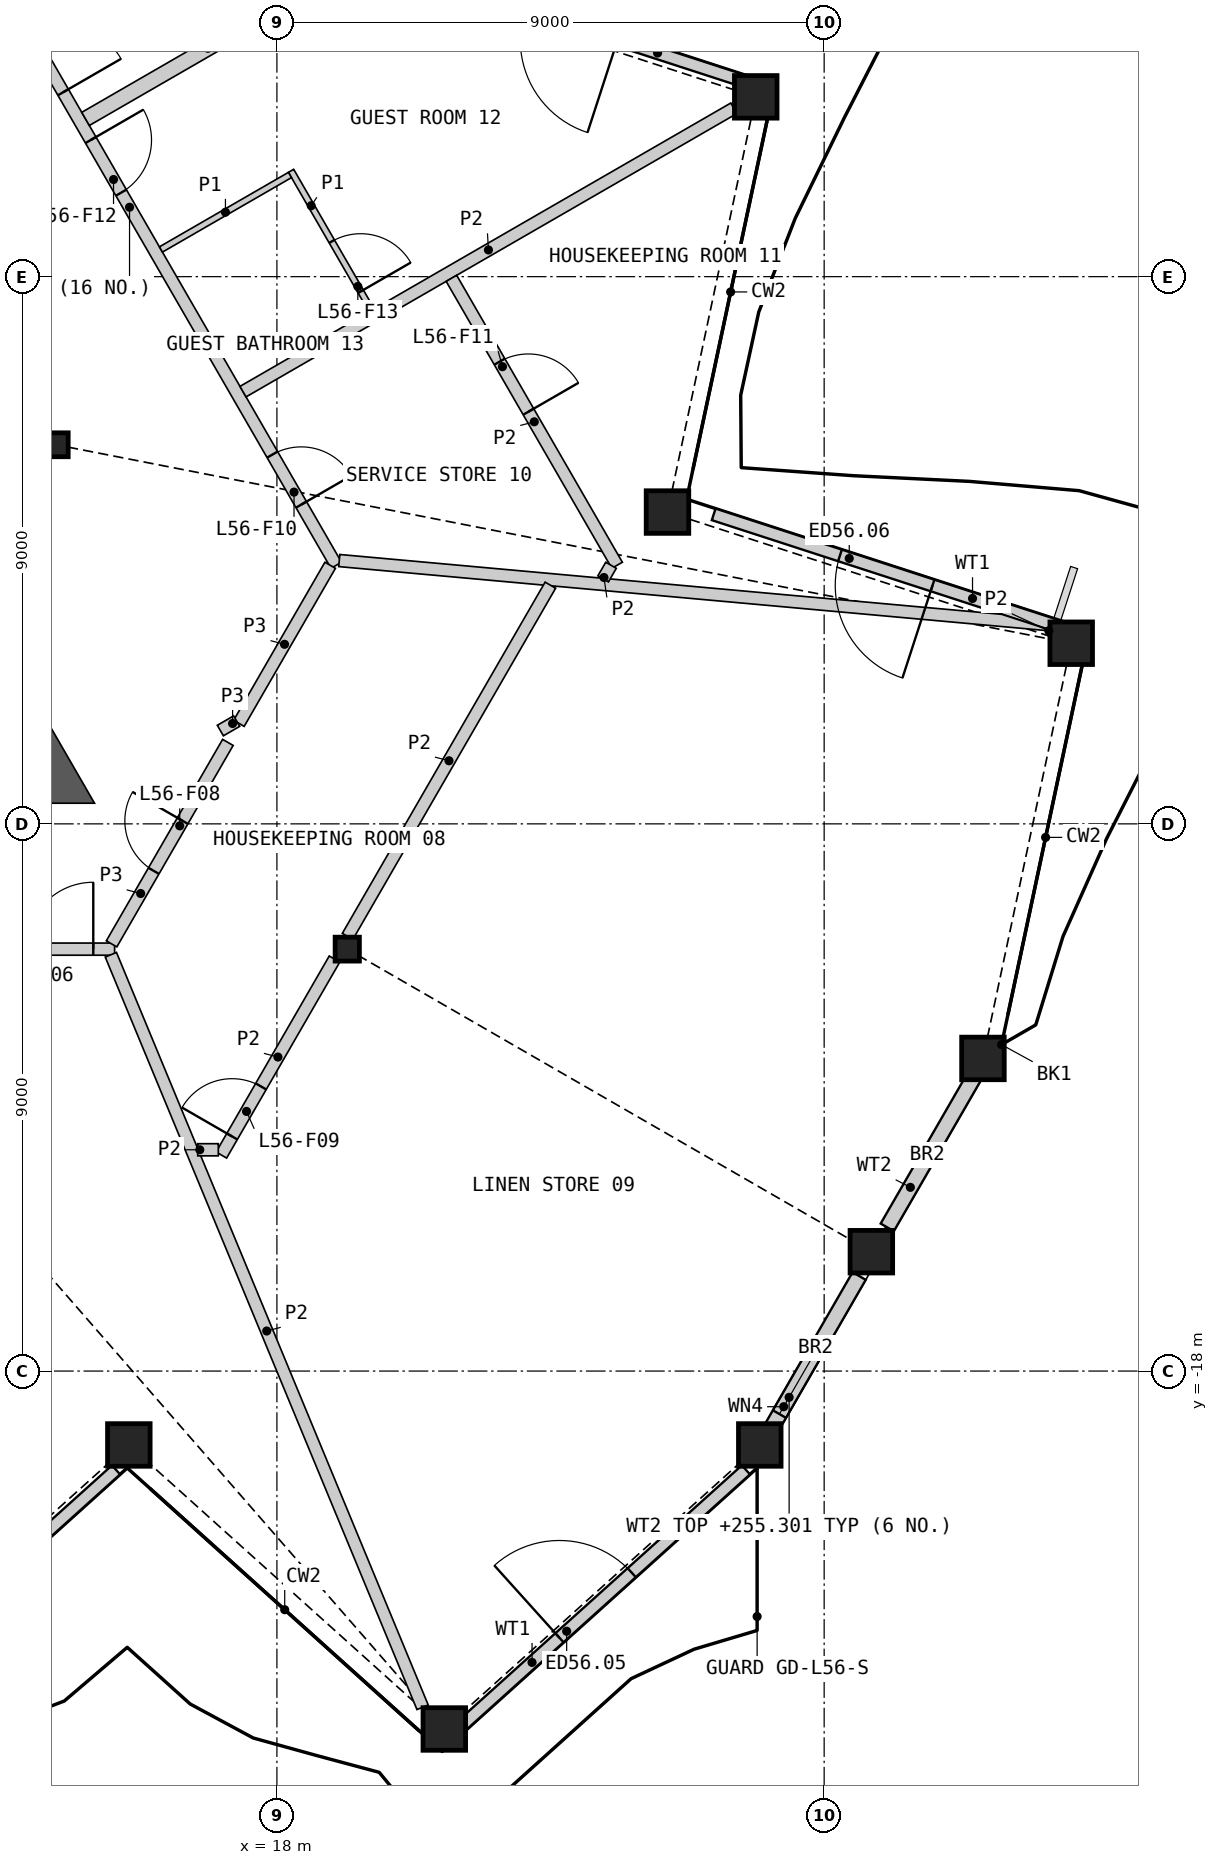
"""IFC4 building model, lengths in metres.
Left out: names, types, materials, properties, quantities, classifications, styles, units other than length and angle.
Written with IfcOpenShell. Run it as: python <this file> out.ifc"""

import sys

from ifc_helpers import new_model, si_unit, direction, frame, frame_2d, origin, origin_2d, place, context, subcontext, project, spatial, polyline, rectangle, hollow_rectangle, i_section, outline, extrude, element, fill, save


model = new_model("IFC4")
c1 = context("Model", 3, precision=1e-05, world=origin(), true_north=direction((0.0, 1.0)))
c2 = subcontext(c1, "Body", "Model", "MODEL_VIEW")
j1 = project(units=[si_unit("LENGTHUNIT", "METRE"), si_unit("PLANEANGLEUNIT", "RADIAN")], contexts=[c1])
p1 = place(None, origin())
s1 = spatial("IfcSite", under=j1, at=p1, CompositionType="ELEMENT")
p2 = place(p1, origin())
s2 = spatial("IfcBuilding", under=s1, at=p2, CompositionType="ELEMENT")
p3 = place(p2, frame((0.0, 0.0, 252.6)))
s3 = spatial("IfcBuildingStorey", under=s2, at=p3, CompositionType="ELEMENT", Elevation=252.6)
for number, where, z_axis, x_axis in (
    (1, (15.565, -19.215, 0.0), (0.0, 0.0, 1.0), (1.0, 0.0, 0.0)),
    (2, (20.753, -23.887, 0.0), (0.0, 0.0, 1.0), (1.0, 0.0, 0.0)),
    (3, (25.941, -19.215, 0.0), (0.0, 0.0, 1.0), (1.0, 0.0, 0.0)),
    (4, (27.776, -16.037, 0.0), (0.0, 0.0, 1.0), (1.0, 0.0, 0.0)),
    (5, (29.612, -12.858, 0.0), (0.0, 0.0, 1.0), (1.0, 0.0, 0.0)),
    (6, (31.063, -6.029, 0.0), (0.0, 0.0, 1.0), (1.0, 0.0, 0.0)),
    (7, (24.423, -3.872, 0.0), (0.0, 0.0, 1.0), (1.0, 0.0, 0.0)),
    (8, (25.875, 2.957, 0.0), (0.0, 0.0, 1.0), (1.0, 0.0, 0.0)),
):
    element("IfcColumn", number, at=place(p3, frame(where, z_axis=z_axis, x_axis=x_axis)), inside=s3, PredefinedType="COLUMN", context=c2, shape_type="SweptSolid", body=[
        extrude(hollow_rectangle(XDim=0.7, YDim=0.7, WallThickness=0.045, at=origin_2d()), origin(), (0.0, 0.0, 1.0), 3.6),
    ])
for number, where, z_axis, x_axis in (
    (9, (19.157, -11.06, 0.0), (0.0, 0.0, 1.0), (1.0, 0.0, 0.0)),
    (10, (14.368, -2.765, 0.0), (0.0, 0.0, 1.0), (1.0, 0.0, 0.0)),
):
    element("IfcColumn", number, at=place(p3, frame(where, z_axis=z_axis, x_axis=x_axis)), inside=s3, PredefinedType="COLUMN", context=c2, shape_type="SweptSolid", body=[
        extrude(i_section(OverallWidth=0.399, OverallDepth=0.393, WebThickness=0.023, FlangeThickness=0.037, at=origin_2d()), origin(), (0.0, 0.0, 1.0), 3.6),
    ])
p4 = place(p3, frame((10.664, -23.848, 0.0), z_axis=(0.0, 0.0, 1.0), x_axis=(0.74314024121, 0.669135697668, 0.0)))
e11 = element("IfcWall", 11, at=p4, inside=s3, PredefinedType="SOLIDWALL", context=c2, shape_type="SweptSolid", body=[
    extrude(rectangle(XDim=6.311, YDim=0.2, at=frame_2d((3.156, 0.0))), origin(), (0.0, 0.0, 1.0), 2.701),
])
p5 = place(p4, frame((2.184, 0.0, 0.0)))
e12 = element("IfcOpeningElement", 12, at=p5, cuts=e11, PredefinedType="OPENING", context=c2, shape_type="SweptSolid", body=[
    extrude(rectangle(XDim=1.6, YDim=2.4, at=frame_2d((0.8, 1.2))), frame((0.0, 0.11, 0.0), z_axis=(0.0, -1.0, 0.0), x_axis=(1.0, 0.0, 0.0)), (0.0, 0.0, 1.0), 0.22),
])
p6 = place(p3, frame((21.023, -23.848, 0.0), z_axis=(0.0, 0.0, 1.0), x_axis=(0.74314024121, 0.669135697668, 0.0)))
e13 = element("IfcWall", 13, at=p6, inside=s3, PredefinedType="SOLIDWALL", context=c2, shape_type="SweptSolid", body=[
    extrude(rectangle(XDim=6.311, YDim=0.2, at=frame_2d((3.156, 0.0))), origin(), (0.0, 0.0, 1.0), 2.701),
])
p7 = place(p6, frame((2.184, 0.0, 0.0)))
e14 = element("IfcOpeningElement", 14, at=p7, cuts=e13, PredefinedType="OPENING", context=c2, shape_type="SweptSolid", body=[
    extrude(rectangle(XDim=1.6, YDim=2.4, at=frame_2d((0.8, 1.2))), frame((0.0, 0.11, 0.0), z_axis=(0.0, -1.0, 0.0), x_axis=(1.0, 0.0, 0.0)), (0.0, 0.0, 1.0), 0.22),
])
p8 = place(p3, frame((26.04, -19.097, 0.0), z_axis=(0.0, 0.0, 1.0), x_axis=(0.499976998774, 0.866038683141, 0.0)))
e15 = element("IfcWall", 15, at=p8, inside=s3, PredefinedType="SOLIDWALL", context=c2, shape_type="SweptSolid", body=[
    extrude(rectangle(XDim=3.072, YDim=0.25, at=frame_2d((1.536, 0.0))), origin(), (0.0, 0.0, 1.0), 2.701),
])
p9 = place(p8, frame((0.45, 0.0, 1.8)))
e16 = element("IfcOpeningElement", 16, at=p9, cuts=e15, PredefinedType="OPENING", context=c2, shape_type="SweptSolid", body=[
    extrude(rectangle(XDim=1.4, YDim=0.7, at=frame_2d((0.7, 0.35))), frame((0.0, 0.135, 0.0), z_axis=(0.0, -1.0, 0.0), x_axis=(1.0, 0.0, 0.0)), (0.0, 0.0, 1.0), 0.27),
])
p10 = place(p3, frame((28.038, -15.637, 0.0), z_axis=(0.0, 0.0, 1.0), x_axis=(0.500023511883, 0.866011828767, 0.0)))
e17 = element("IfcWall", 17, at=p10, inside=s3, PredefinedType="SOLIDWALL", context=c2, shape_type="SweptSolid", body=[
    extrude(rectangle(XDim=3.042, YDim=0.25, at=frame_2d((1.521, 0.0))), origin(), (0.0, 0.0, 1.0), 2.701),
])
p11 = place(p3, frame((30.859, -5.754, 0.0), z_axis=(0.0, 0.0, 1.0), x_axis=(-0.951049400374, 0.309038894069, 0.0)))
e18 = element("IfcWall", 18, at=p11, inside=s3, PredefinedType="SOLIDWALL", context=c2, shape_type="SweptSolid", body=[
    extrude(rectangle(XDim=5.968, YDim=0.2, at=frame_2d((2.984, 0.0))), origin(), (0.0, 0.0, 1.0), 2.701),
])
p12 = place(p11, frame((2.184, 0.0, 0.0)))
e19 = element("IfcOpeningElement", 19, at=p12, cuts=e18, PredefinedType="OPENING", context=c2, shape_type="SweptSolid", body=[
    extrude(rectangle(XDim=1.6, YDim=2.4, at=frame_2d((0.8, 1.2))), frame((0.0, 0.11, 0.0), z_axis=(0.0, -1.0, 0.0), x_axis=(1.0, 0.0, 0.0)), (0.0, 0.0, 1.0), 0.22),
])
p13 = place(p3, frame((25.679, 3.217, 0.0), z_axis=(0.0, 0.0, 1.0), x_axis=(-0.951049400374, 0.309038894069, 0.0)))
e20 = element("IfcWall", 20, at=p13, inside=s3, PredefinedType="SOLIDWALL", context=c2, shape_type="SweptSolid", body=[
    extrude(rectangle(XDim=5.968, YDim=0.2, at=frame_2d((2.984, 0.0))), origin(), (0.0, 0.0, 1.0), 2.701),
])
p14 = place(p13, frame((2.184, 0.0, 0.0)))
e21 = element("IfcOpeningElement", 21, at=p14, cuts=e20, PredefinedType="OPENING", context=c2, shape_type="SweptSolid", body=[
    extrude(rectangle(XDim=1.6, YDim=2.4, at=frame_2d((0.8, 1.2))), frame((0.0, 0.11, 0.0), z_axis=(0.0, -1.0, 0.0), x_axis=(1.0, 0.0, 0.0)), (0.0, 0.0, 1.0), 0.22),
])
p15 = place(p3, origin())
e22 = element("IfcWall", 22, at=p15, inside=s3, PredefinedType="SHEAR", context=c2, shape_type="SweptSolid", body=[
    extrude(outline(polyline([(12.748, -8.66), (12.748, -7.36), (13.874, -6.71), (15.0, -8.66), (12.748, -8.66)])), origin(), (0.0, 0.0, 1.0), 3.25),
])
p16 = place(p3, frame((5.377, 18.807, 0.0), z_axis=(0.0, 0.0, 1.0), x_axis=(0.499999852422, -0.866025488988, 0.0)))
e23 = element("IfcWall", 23, at=p16, inside=s3, PredefinedType="PARTITIONING", context=c2, shape_type="SweptSolid", body=[
    extrude(rectangle(XDim=27.198, YDim=0.2, at=frame_2d((13.599, 0.0))), origin(), (0.0, 0.0, 1.0), 3.25),
])
p17 = place(p16, frame((25.096, 0.0, 0.0)))
e24 = element("IfcOpeningElement", 24, at=p17, cuts=e23, PredefinedType="OPENING", context=c2, shape_type="SweptSolid", body=[
    extrude(rectangle(XDim=0.95, YDim=2.1, at=frame_2d((0.475, 1.05))), frame((0.0, 0.11, 0.0), z_axis=(0.0, -1.0, 0.0), x_axis=(1.0, 0.0, 0.0)), (0.0, 0.0, 1.0), 0.22),
])
p18 = place(p16, frame((19.122, 0.0, 0.0)))
e25 = element("IfcOpeningElement", 25, at=p18, cuts=e23, PredefinedType="OPENING", context=c2, shape_type="SweptSolid", body=[
    extrude(rectangle(XDim=1.0, YDim=2.1, at=frame_2d((0.5, 1.05))), frame((0.0, 0.11, 0.0), z_axis=(0.0, -1.0, 0.0), x_axis=(1.0, 0.0, 0.0)), (0.0, 0.0, 1.0), 0.22),
])
p19 = place(p16, frame((17.115, 0.0, 0.0)))
e26 = element("IfcOpeningElement", 26, at=p19, cuts=e23, PredefinedType="OPENING", context=c2, shape_type="SweptSolid", body=[
    extrude(rectangle(XDim=1.1, YDim=2.1, at=frame_2d((0.55, 1.05))), frame((0.0, 0.11, 0.0), z_axis=(0.0, -1.0, 0.0), x_axis=(1.0, 0.0, 0.0)), (0.0, 0.0, 1.0), 0.22),
])
p20 = place(p16, frame((0.35, 0.0, 0.0)))
e27 = element("IfcOpeningElement", 27, at=p20, cuts=e23, PredefinedType="OPENING", context=c2, shape_type="SweptSolid", body=[
    extrude(rectangle(XDim=1.1, YDim=2.1, at=frame_2d((0.55, 1.05))), frame((0.0, 0.11, 0.0), z_axis=(0.0, -1.0, 0.0), x_axis=(1.0, 0.0, 0.0)), (0.0, 0.0, 1.0), 0.22),
])
p21 = place(p3, frame((9.788, -11.06, 0.0), z_axis=(0.0, 0.0, 1.0), x_axis=(1.0, 0.0, 0.0)))
e28 = element("IfcWall", 28, at=p21, inside=s3, PredefinedType="PARTITIONING", context=c2, shape_type="SweptSolid", body=[
    extrude(rectangle(XDim=5.543, YDim=0.2, at=frame_2d((2.771, 0.0))), origin(), (0.0, 0.0, 1.0), 3.25),
])
p22 = place(p21, frame((4.092, 0.0, 0.0)))
e29 = element("IfcOpeningElement", 29, at=p22, cuts=e28, PredefinedType="OPENING", context=c2, shape_type="SweptSolid", body=[
    extrude(rectangle(XDim=1.1, YDim=2.1, at=frame_2d((0.55, 1.05))), frame((0.0, 0.11, 0.0), z_axis=(0.0, -1.0, 0.0), x_axis=(1.0, 0.0, 0.0)), (0.0, 0.0, 1.0), 0.22),
])
p23 = place(p3, frame((14.853, 2.594, 0.0), z_axis=(0.0, 0.0, 1.0), x_axis=(0.866021891294, 0.500006083763, 0.0)))
e30 = element("IfcWall", 30, at=p23, inside=s3, PredefinedType="PARTITIONING", context=c2, shape_type="SweptSolid", body=[
    extrude(rectangle(XDim=4.645, YDim=0.25, at=frame_2d((2.322, 0.0))), origin(), (0.0, 0.0, 1.0), 2.404),
])
p24 = place(p3, frame((15.281, -10.974, 0.0), z_axis=(0.0, 0.0, 1.0), x_axis=(0.499989446428, 0.866031496806, 0.0)))
e31 = element("IfcWall", 31, at=p24, inside=s3, PredefinedType="PARTITIONING", context=c2, shape_type="SweptSolid", body=[
    extrude(rectangle(XDim=3.826, YDim=0.2, at=frame_2d((1.913, 0.0))), origin(), (0.0, 0.0, 1.0), 3.25),
])
p25 = place(p24, frame((1.386, 0.0, 0.0)))
e32 = element("IfcOpeningElement", 32, at=p25, cuts=e31, PredefinedType="OPENING", context=c2, shape_type="SweptSolid", body=[
    extrude(rectangle(XDim=0.95, YDim=2.1, at=frame_2d((0.475, 1.05))), frame((0.0, 0.11, 0.0), z_axis=(0.0, -1.0, 0.0), x_axis=(1.0, 0.0, 0.0)), (0.0, 0.0, 1.0), 0.22),
])
p26 = place(p3, frame((17.375, -7.347, 0.0), z_axis=(0.0, 0.0, 1.0), x_axis=(0.499952404951, 0.866052881055, 0.0)))
e33 = element("IfcWall", 33, at=p26, inside=s3, PredefinedType="PARTITIONING", context=c2, shape_type="SweptSolid", body=[
    extrude(rectangle(XDim=3.002, YDim=0.2, at=frame_2d((1.501, 0.0))), origin(), (0.0, 0.0, 1.0), 3.25),
])
p27 = place(p3, frame((17.07, -7.465, 0.0), z_axis=(0.0, 0.0, 1.0), x_axis=(0.866054481515, 0.499949632511, 0.0)))
e34 = element("IfcWall", 34, at=p27, inside=s3, PredefinedType="PARTITIONING", context=c2, shape_type="SweptSolid", body=[
    extrude(rectangle(XDim=0.31, YDim=0.2, at=frame_2d((0.155, 0.0))), origin(), (0.0, 0.0, 1.0), 3.25),
])
p28 = place(p3, frame((15.269, -11.153, 0.0), z_axis=(0.0, 0.0, 1.0), x_axis=(0.382692998932, -0.923875569851, 0.0)))
e35 = element("IfcWall", 35, at=p28, inside=s3, PredefinedType="PARTITIONING", context=c2, shape_type="SweptSolid", body=[
    extrude(rectangle(XDim=13.397, YDim=0.2, at=frame_2d((6.698, 0.0))), origin(), (0.0, 0.0, 1.0), 2.404),
])
p29 = place(p3, origin())
e36 = element("IfcWall", 36, at=p29, inside=s3, PredefinedType="PARTITIONING", context=c2, shape_type="SweptSolid", body=[
    extrude(outline(polyline([(30.694, -5.824), (19.017, -4.769), (19.034, -4.57), (29.918, -5.553), (30.696, -5.806), (30.694, -5.824)])), origin(), (0.0, 0.0, 1.0), 2.404),
])
p30 = place(p3, frame((17.443, -1.891, 0.0), z_axis=(0.0, 0.0, 1.0), x_axis=(0.866019838429, 0.500009639354, 0.0)))
e37 = element("IfcWall", 37, at=p30, inside=s3, PredefinedType="PARTITIONING", context=c2, shape_type="SweptSolid", body=[
    extrude(rectangle(XDim=9.321, YDim=0.2, at=frame_2d((4.661, 0.0))), origin(), (0.0, 0.0, 1.0), 2.404),
])
p31 = place(p3, frame((19.162, -10.851, 0.0), z_axis=(0.0, 0.0, 1.0), x_axis=(0.500008654708, 0.866020406929, 0.0)))
e38 = element("IfcWall", 38, at=p31, inside=s3, PredefinedType="PARTITIONING", context=c2, shape_type="SweptSolid", body=[
    extrude(rectangle(XDim=6.67, YDim=0.2, at=frame_2d((3.335, 0.0))), origin(), (0.0, 0.0, 1.0), 2.404),
])
p32 = place(p3, frame((20.87, -0.028, 0.0), z_axis=(0.0, 0.0, 1.0), x_axis=(0.499993928037, -0.866028909405, 0.0)))
e39 = element("IfcWall", 39, at=p32, inside=s3, PredefinedType="PARTITIONING", context=c2, shape_type="SweptSolid", body=[
    extrude(rectangle(XDim=5.449, YDim=0.2, at=frame_2d((2.725, 0.0))), origin(), (0.0, 0.0, 1.0), 2.404),
])
p33 = place(p32, frame((1.583, 0.0, 0.0)))
e40 = element("IfcOpeningElement", 40, at=p33, cuts=e39, PredefinedType="OPENING", context=c2, shape_type="SweptSolid", body=[
    extrude(rectangle(XDim=0.95, YDim=2.1, at=frame_2d((0.475, 1.05))), frame((0.0, 0.11, 0.0), z_axis=(0.0, -1.0, 0.0), x_axis=(1.0, 0.0, 0.0)), (0.0, 0.0, 1.0), 0.22),
])
p34 = place(p3, frame((17.086, -14.447, 0.0), z_axis=(0.0, 0.0, 1.0), x_axis=(0.500004411858, 0.866022856582, 0.0)))
e41 = element("IfcWall", 41, at=p34, inside=s3, PredefinedType="PARTITIONING", context=c2, shape_type="SweptSolid", body=[
    extrude(rectangle(XDim=3.723, YDim=0.2, at=frame_2d((1.861, 0.0))), origin(), (0.0, 0.0, 1.0), 2.404),
])
p35 = place(p34, frame((0.353, 0.0, 0.0)))
e42 = element("IfcOpeningElement", 42, at=p35, cuts=e41, PredefinedType="OPENING", context=c2, shape_type="SweptSolid", body=[
    extrude(rectangle(XDim=0.95, YDim=2.1, at=frame_2d((0.475, 1.05))), frame((0.0, 0.11, 0.0), z_axis=(0.0, -1.0, 0.0), x_axis=(1.0, 0.0, 0.0)), (0.0, 0.0, 1.0), 0.22),
])
p36 = place(p3, frame((16.698, -14.36, 0.0), z_axis=(0.0, 0.0, 1.0), x_axis=(1.0, 0.0, 0.0)))
e43 = element("IfcWall", 43, at=p36, inside=s3, PredefinedType="PARTITIONING", context=c2, shape_type="SweptSolid", body=[
    extrude(rectangle(XDim=0.338, YDim=0.2, at=frame_2d((0.169, 0.0))), origin(), (0.0, 0.0, 1.0), 2.404),
])
p37 = place(p3, frame((23.366, -4.97, 0.0), z_axis=(0.0, 0.0, 1.0), x_axis=(0.500104332946, 0.86596515875, 0.0)))
e44 = element("IfcWall", 44, at=p37, inside=s3, PredefinedType="PARTITIONING", context=c2, shape_type="SweptSolid", body=[
    extrude(rectangle(XDim=0.258, YDim=0.2, at=frame_2d((0.129, 0.0))), origin(), (0.0, 0.0, 1.0), 2.404),
])
p38 = place(p3, frame((18.233, 1.74, 0.0), z_axis=(0.0, 0.0, 1.0), x_axis=(0.499993606316, -0.866029095148, 0.0)))
e45 = element("IfcWall", 45, at=p38, inside=s3, PredefinedType="PARTITIONING", context=c2, shape_type="SweptSolid", body=[
    extrude(rectangle(XDim=2.65, YDim=0.1, at=frame_2d((1.325, 0.0))), origin(), (0.0, 0.0, 1.0), 2.404),
])
p39 = place(p38, frame((1.341, 0.0, 0.0)))
e46 = element("IfcOpeningElement", 46, at=p39, cuts=e45, PredefinedType="OPENING", context=c2, shape_type="SweptSolid", body=[
    extrude(rectangle(XDim=0.95, YDim=2.1, at=frame_2d((0.475, 1.05))), frame((0.0, 0.06, 0.0), z_axis=(0.0, -1.0, 0.0), x_axis=(1.0, 0.0, 0.0)), (0.0, 0.0, 1.0), 0.12),
])
p40 = place(p3, frame((16.093, 0.447, 0.0), z_axis=(0.0, 0.0, 1.0), x_axis=(0.866057815567, 0.499943856944, 0.0)))
e47 = element("IfcWall", 47, at=p40, inside=s3, PredefinedType="PARTITIONING", context=c2, shape_type="SweptSolid", body=[
    extrude(rectangle(XDim=2.45, YDim=0.1, at=frame_2d((1.225, 0.0))), origin(), (0.0, 0.0, 1.0), 2.404),
])
p41 = place(p7, origin())
e48 = element("IfcDoor", 48, at=p41, inside=s3, OperationType="DOUBLE_DOOR_SINGLE_SWING", PredefinedType="DOOR", context=c2, shape_type="SweptSolid", body=[
    extrude(rectangle(XDim=1.6, YDim=2.4, at=frame_2d((0.8, 1.2))), frame((0.0, 0.025, 0.0), z_axis=(0.0, -1.0, 0.0), x_axis=(1.0, 0.0, 0.0)), (0.0, 0.0, 1.0), 0.05),
])
fill(e14, e48)
p42 = place(p9, origin())
e49 = element("IfcWindow", 49, at=p42, inside=s3, PartitioningType="SINGLE_PANEL", PredefinedType="WINDOW", context=c2, shape_type="SweptSolid", body=[
    extrude(rectangle(XDim=1.4, YDim=0.7, at=frame_2d((0.7, 0.35))), frame((0.0, 0.03, 0.0), z_axis=(0.0, -1.0, 0.0), x_axis=(1.0, 0.0, 0.0)), (0.0, 0.0, 1.0), 0.06),
])
fill(e16, e49)
p43 = place(p12, origin())
e50 = element("IfcDoor", 50, at=p43, inside=s3, OperationType="DOUBLE_DOOR_SINGLE_SWING", PredefinedType="DOOR", context=c2, shape_type="SweptSolid", body=[
    extrude(rectangle(XDim=1.6, YDim=2.4, at=frame_2d((0.8, 1.2))), frame((0.0, 0.025, 0.0), z_axis=(0.0, -1.0, 0.0), x_axis=(1.0, 0.0, 0.0)), (0.0, 0.0, 1.0), 0.05),
])
fill(e19, e50)
p44 = place(p22, origin())
e51 = element("IfcDoor", 51, at=p44, inside=s3, OperationType="SINGLE_SWING_RIGHT", PredefinedType="DOOR", context=c2, shape_type="SweptSolid", body=[
    extrude(rectangle(XDim=1.1, YDim=2.1, at=frame_2d((0.55, 1.05))), frame((0.0, 0.025, 0.0), z_axis=(0.0, -1.0, 0.0), x_axis=(1.0, 0.0, 0.0)), (0.0, 0.0, 1.0), 0.05),
])
fill(e29, e51)
p45 = place(p25, origin())
e52 = element("IfcDoor", 52, at=p45, inside=s3, OperationType="SINGLE_SWING_RIGHT", PredefinedType="DOOR", context=c2, shape_type="SweptSolid", body=[
    extrude(rectangle(XDim=0.95, YDim=2.1, at=frame_2d((0.475, 1.05))), frame((0.0, 0.025, 0.0), z_axis=(0.0, -1.0, 0.0), x_axis=(1.0, 0.0, 0.0)), (0.0, 0.0, 1.0), 0.05),
])
fill(e32, e52)
p46 = place(p35, origin())
e53 = element("IfcDoor", 53, at=p46, inside=s3, OperationType="SINGLE_SWING_LEFT", PredefinedType="DOOR", context=c2, shape_type="SweptSolid", body=[
    extrude(rectangle(XDim=0.95, YDim=2.1, at=frame_2d((0.475, 1.05))), frame((0.0, 0.025, 0.0), z_axis=(0.0, -1.0, 0.0), x_axis=(1.0, 0.0, 0.0)), (0.0, 0.0, 1.0), 0.05),
])
fill(e42, e53)
p47 = place(p17, origin())
e54 = element("IfcDoor", 54, at=p47, inside=s3, OperationType="SINGLE_SWING_RIGHT", PredefinedType="DOOR", context=c2, shape_type="SweptSolid", body=[
    extrude(rectangle(XDim=0.95, YDim=2.1, at=frame_2d((0.475, 1.05))), frame((0.0, 0.025, 0.0), z_axis=(0.0, -1.0, 0.0), x_axis=(1.0, 0.0, 0.0)), (0.0, 0.0, 1.0), 0.05),
])
fill(e24, e54)
p48 = place(p33, origin())
e55 = element("IfcDoor", 55, at=p48, inside=s3, OperationType="SINGLE_SWING_RIGHT", PredefinedType="DOOR", context=c2, shape_type="SweptSolid", body=[
    extrude(rectangle(XDim=0.95, YDim=2.1, at=frame_2d((0.475, 1.05))), frame((0.0, 0.025, 0.0), z_axis=(0.0, -1.0, 0.0), x_axis=(1.0, 0.0, 0.0)), (0.0, 0.0, 1.0), 0.05),
])
fill(e40, e55)
p49 = place(p18, origin())
e56 = element("IfcDoor", 56, at=p49, inside=s3, OperationType="SINGLE_SWING_LEFT", PredefinedType="DOOR", context=c2, shape_type="SweptSolid", body=[
    extrude(rectangle(XDim=1.0, YDim=2.1, at=frame_2d((0.5, 1.05))), frame((0.0, 0.025, 0.0), z_axis=(0.0, -1.0, 0.0), x_axis=(1.0, 0.0, 0.0)), (0.0, 0.0, 1.0), 0.05),
])
fill(e25, e56)
p50 = place(p39, origin())
e57 = element("IfcDoor", 57, at=p50, inside=s3, OperationType="SINGLE_SWING_RIGHT", PredefinedType="DOOR", context=c2, shape_type="SweptSolid", body=[
    extrude(rectangle(XDim=0.95, YDim=2.1, at=frame_2d((0.475, 1.05))), frame((0.0, 0.025, 0.0), z_axis=(0.0, -1.0, 0.0), x_axis=(1.0, 0.0, 0.0)), (0.0, 0.0, 1.0), 0.05),
])
fill(e46, e57)
p51 = place(p19, origin())
e58 = element("IfcDoor", 58, at=p51, inside=s3, OperationType="SINGLE_SWING_RIGHT", PredefinedType="DOOR", context=c2, shape_type="SweptSolid", body=[
    extrude(rectangle(XDim=1.1, YDim=2.1, at=frame_2d((0.55, 1.05))), frame((0.0, 0.025, 0.0), z_axis=(0.0, -1.0, 0.0), x_axis=(1.0, 0.0, 0.0)), (0.0, 0.0, 1.0), 0.05),
])
fill(e26, e58)
save(model, sys.argv[1])
